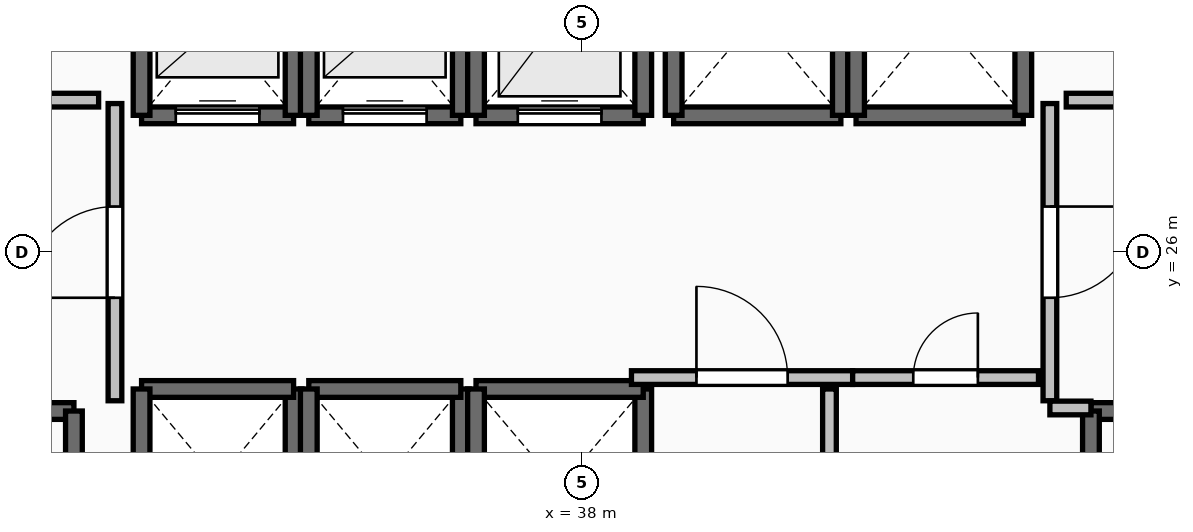
"""IFC4 building model, lengths in metres.
Left out: names, types, materials, properties, quantities, classifications, styles, units other than length and angle.
Written with IfcOpenShell. Run it as: python <this file> out.ifc"""

import sys

from ifc_helpers import new_model, si_unit, direction, frame, frame_2d, origin, place, context, subcontext, project, spatial, rectangle, extrude, element, fill, save


model = new_model("IFC4")
c1 = context("Model", 3, precision=1e-05, world=origin(), true_north=direction((0.0, 1.0)))
c2 = subcontext(c1, "Body", "Model", "MODEL_VIEW")
j1 = project(units=[si_unit("LENGTHUNIT", "METRE"), si_unit("PLANEANGLEUNIT", "RADIAN")], contexts=[c1])
p1 = place(None, origin())
s1 = spatial("IfcSite", under=j1, at=p1, CompositionType="ELEMENT")
p2 = place(p1, origin())
s2 = spatial("IfcBuilding", under=s1, at=p2, CompositionType="ELEMENT")
p3 = place(p2, frame((0.0, 0.0, 106.8)))
s3 = spatial("IfcBuildingStorey", under=s2, at=p3, CompositionType="ELEMENT", Elevation=106.8)
p4 = place(p3, frame((27.94, 23.91, 0.0), z_axis=(0.0, 0.0, 1.0), x_axis=(1.0, 0.0, 0.0)))
e1 = element("IfcWall", 1, at=p4, inside=s3, PredefinedType="SOLIDWALL", context=c2, shape_type="SweptSolid", body=[
    extrude(rectangle(XDim=3.37, YDim=0.22, at=frame_2d((1.685, 0.0))), origin(), (0.0, 0.0, 1.0), 3.24),
])
p5 = place(p4, frame((1.135, 0.0, 0.0)))
e2 = element("IfcOpeningElement", 2, at=p5, cuts=e1, PredefinedType="OPENING", context=c2, shape_type="SweptSolid", body=[
    extrude(rectangle(XDim=1.1, YDim=2.15, at=frame_2d((0.55, 1.075))), frame((0.0, 0.125, 0.0), z_axis=(0.0, -1.0, 0.0), x_axis=(1.0, 0.0, 0.0)), (0.0, 0.0, 1.0), 0.25),
])
p6 = place(p3, frame((31.31, 23.91, 0.0), z_axis=(0.0, 0.0, 1.0), x_axis=(0.0, -1.0, 0.0)))
e3 = element("IfcWall", 3, at=p6, inside=s3, PredefinedType="SOLIDWALL", context=c2, shape_type="SweptSolid", body=[
    extrude(rectangle(XDim=7.42, YDim=0.22, at=frame_2d((3.71, 0.0))), origin(), (0.0, 0.0, 1.0), 3.24),
])
p7 = place(p3, frame((44.69, 23.91, 0.0), z_axis=(0.0, 0.0, 1.0), x_axis=(1.0, 0.0, 0.0)))
e4 = element("IfcWall", 4, at=p7, inside=s3, PredefinedType="SOLIDWALL", context=c2, shape_type="SweptSolid", body=[
    extrude(rectangle(XDim=3.37, YDim=0.22, at=frame_2d((1.685, 0.0))), origin(), (0.0, 0.0, 1.0), 3.24),
])
p8 = place(p7, frame((1.135, 0.0, 0.0)))
e5 = element("IfcOpeningElement", 5, at=p8, cuts=e4, PredefinedType="OPENING", context=c2, shape_type="SweptSolid", body=[
    extrude(rectangle(XDim=1.1, YDim=2.15, at=frame_2d((0.55, 1.075))), frame((0.0, 0.125, 0.0), z_axis=(0.0, -1.0, 0.0), x_axis=(1.0, 0.0, 0.0)), (0.0, 0.0, 1.0), 0.25),
])
p9 = place(p3, frame((44.69, 16.49, 0.0), z_axis=(0.0, 0.0, 1.0), x_axis=(0.0, 1.0, 0.0)))
e6 = element("IfcWall", 6, at=p9, inside=s3, PredefinedType="SOLIDWALL", context=c2, shape_type="SweptSolid", body=[
    extrude(rectangle(XDim=7.42, YDim=0.22, at=frame_2d((3.71, 0.0))), origin(), (0.0, 0.0, 1.0), 3.24),
])
p10 = place(p3, frame((32.2, 27.8, 0.0), z_axis=(0.0, 0.0, 1.0), x_axis=(1.0, 0.0, 0.0)))
e7 = element("IfcWall", 7, at=p10, inside=s3, PredefinedType="SOLIDWALL", context=c2, shape_type="SweptSolid", body=[
    extrude(rectangle(XDim=2.0, YDim=0.22, at=frame_2d((1.0, 0.0))), origin(), (0.0, 0.0, 1.0), 3.24),
])
p11 = place(p10, frame((0.45, 0.0, 0.0)))
e8 = element("IfcOpeningElement", 8, at=p11, cuts=e7, PredefinedType="OPENING", context=c2, shape_type="SweptSolid", body=[
    extrude(rectangle(XDim=1.1, YDim=2.2, at=frame_2d((0.55, 1.1))), frame((0.0, 0.125, 0.0), z_axis=(0.0, -1.0, 0.0), x_axis=(1.0, 0.0, 0.0)), (0.0, 0.0, 1.0), 0.25),
])
for number, where, z_axis, x_axis in (
    (9, (34.2, 27.8, 0.0), (0.0, 0.0, 1.0), (0.0, 1.0, 0.0)),
    (10, (32.2, 30.2, 0.0), (0.0, 0.0, 1.0), (0.0, -1.0, 0.0)),
):
    element("IfcWall", number, at=place(p3, frame(where, z_axis=z_axis, x_axis=x_axis)), inside=s3, PredefinedType="SOLIDWALL", context=c2, shape_type="SweptSolid", body=[
        extrude(rectangle(XDim=2.4, YDim=0.22, at=frame_2d((1.2, 0.0))), origin(), (0.0, 0.0, 1.0), 3.24),
    ])
p12 = place(p3, frame((34.4, 27.8, 0.0), z_axis=(0.0, 0.0, 1.0), x_axis=(1.0, 0.0, 0.0)))
e11 = element("IfcWall", 11, at=p12, inside=s3, PredefinedType="SOLIDWALL", context=c2, shape_type="SweptSolid", body=[
    extrude(rectangle(XDim=2.0, YDim=0.22, at=frame_2d((1.0, 0.0))), origin(), (0.0, 0.0, 1.0), 3.24),
])
p13 = place(p12, frame((0.45, 0.0, 0.0)))
e12 = element("IfcOpeningElement", 12, at=p13, cuts=e11, PredefinedType="OPENING", context=c2, shape_type="SweptSolid", body=[
    extrude(rectangle(XDim=1.1, YDim=2.2, at=frame_2d((0.55, 1.1))), frame((0.0, 0.125, 0.0), z_axis=(0.0, -1.0, 0.0), x_axis=(1.0, 0.0, 0.0)), (0.0, 0.0, 1.0), 0.25),
])
for number, where, z_axis, x_axis in (
    (13, (36.4, 27.8, 0.0), (0.0, 0.0, 1.0), (0.0, 1.0, 0.0)),
    (14, (34.4, 30.2, 0.0), (0.0, 0.0, 1.0), (0.0, -1.0, 0.0)),
):
    element("IfcWall", number, at=place(p3, frame(where, z_axis=z_axis, x_axis=x_axis)), inside=s3, PredefinedType="SOLIDWALL", context=c2, shape_type="SweptSolid", body=[
        extrude(rectangle(XDim=2.4, YDim=0.22, at=frame_2d((1.2, 0.0))), origin(), (0.0, 0.0, 1.0), 3.24),
    ])
p14 = place(p3, frame((36.6, 27.8, 0.0), z_axis=(0.0, 0.0, 1.0), x_axis=(1.0, 0.0, 0.0)))
e15 = element("IfcWall", 15, at=p14, inside=s3, PredefinedType="SOLIDWALL", context=c2, shape_type="SweptSolid", body=[
    extrude(rectangle(XDim=2.2, YDim=0.22, at=frame_2d((1.1, 0.0))), origin(), (0.0, 0.0, 1.0), 3.24),
])
p15 = place(p14, frame((0.55, 0.0, 0.0)))
e16 = element("IfcOpeningElement", 16, at=p15, cuts=e15, PredefinedType="OPENING", context=c2, shape_type="SweptSolid", body=[
    extrude(rectangle(XDim=1.1, YDim=2.2, at=frame_2d((0.55, 1.1))), frame((0.0, 0.125, 0.0), z_axis=(0.0, -1.0, 0.0), x_axis=(1.0, 0.0, 0.0)), (0.0, 0.0, 1.0), 0.25),
])
for number, where, z_axis, x_axis in (
    (17, (38.8, 27.8, 0.0), (0.0, 0.0, 1.0), (0.0, 1.0, 0.0)),
    (18, (36.6, 30.4, 0.0), (0.0, 0.0, 1.0), (0.0, -1.0, 0.0)),
):
    element("IfcWall", number, at=place(p3, frame(where, z_axis=z_axis, x_axis=x_axis)), inside=s3, PredefinedType="SOLIDWALL", context=c2, shape_type="SweptSolid", body=[
        extrude(rectangle(XDim=2.6, YDim=0.22, at=frame_2d((1.3, 0.0))), origin(), (0.0, 0.0, 1.0), 3.24),
    ])
p16 = place(p3, frame((34.2, 21.8, 0.0), z_axis=(0.0, 0.0, 1.0), x_axis=(0.0, 1.0, 0.0)))
e19 = element("IfcWall", 19, at=p16, inside=s3, PredefinedType="SOLIDWALL", context=c2, shape_type="SweptSolid", body=[
    extrude(rectangle(XDim=2.4, YDim=0.22, at=frame_2d((1.2, 0.0))), origin(), (0.0, 0.0, 1.0), 3.24),
])
p17 = place(p3, frame((34.2, 24.2, 0.0), z_axis=(0.0, 0.0, 1.0), x_axis=(-1.0, 0.0, 0.0)))
e20 = element("IfcWall", 20, at=p17, inside=s3, PredefinedType="SOLIDWALL", context=c2, shape_type="SweptSolid", body=[
    extrude(rectangle(XDim=2.0, YDim=0.22, at=frame_2d((1.0, 0.0))), origin(), (0.0, 0.0, 1.0), 3.24),
])
for number, where, z_axis, x_axis in (
    (21, (32.2, 24.2, 0.0), (0.0, 0.0, 1.0), (0.0, -1.0, 0.0)),
    (22, (36.4, 21.8, 0.0), (0.0, 0.0, 1.0), (0.0, 1.0, 0.0)),
):
    element("IfcWall", number, at=place(p3, frame(where, z_axis=z_axis, x_axis=x_axis)), inside=s3, PredefinedType="SOLIDWALL", context=c2, shape_type="SweptSolid", body=[
        extrude(rectangle(XDim=2.4, YDim=0.22, at=frame_2d((1.2, 0.0))), origin(), (0.0, 0.0, 1.0), 3.24),
    ])
p18 = place(p3, frame((36.4, 24.2, 0.0), z_axis=(0.0, 0.0, 1.0), x_axis=(-1.0, 0.0, 0.0)))
e23 = element("IfcWall", 23, at=p18, inside=s3, PredefinedType="SOLIDWALL", context=c2, shape_type="SweptSolid", body=[
    extrude(rectangle(XDim=2.0, YDim=0.22, at=frame_2d((1.0, 0.0))), origin(), (0.0, 0.0, 1.0), 3.24),
])
p19 = place(p3, frame((34.4, 24.2, 0.0), z_axis=(0.0, 0.0, 1.0), x_axis=(0.0, -1.0, 0.0)))
e24 = element("IfcWall", 24, at=p19, inside=s3, PredefinedType="SOLIDWALL", context=c2, shape_type="SweptSolid", body=[
    extrude(rectangle(XDim=2.4, YDim=0.22, at=frame_2d((1.2, 0.0))), origin(), (0.0, 0.0, 1.0), 3.24),
])
p20 = place(p3, frame((38.8, 21.6, 0.0), z_axis=(0.0, 0.0, 1.0), x_axis=(0.0, 1.0, 0.0)))
e25 = element("IfcWall", 25, at=p20, inside=s3, PredefinedType="SOLIDWALL", context=c2, shape_type="SweptSolid", body=[
    extrude(rectangle(XDim=2.6, YDim=0.22, at=frame_2d((1.3, 0.0))), origin(), (0.0, 0.0, 1.0), 3.24),
])
p21 = place(p3, frame((38.8, 24.2, 0.0), z_axis=(0.0, 0.0, 1.0), x_axis=(-1.0, 0.0, 0.0)))
e26 = element("IfcWall", 26, at=p21, inside=s3, PredefinedType="SOLIDWALL", context=c2, shape_type="SweptSolid", body=[
    extrude(rectangle(XDim=2.2, YDim=0.22, at=frame_2d((1.1, 0.0))), origin(), (0.0, 0.0, 1.0), 3.24),
])
p22 = place(p3, frame((36.6, 24.2, 0.0), z_axis=(0.0, 0.0, 1.0), x_axis=(0.0, -1.0, 0.0)))
e27 = element("IfcWall", 27, at=p22, inside=s3, PredefinedType="SOLIDWALL", context=c2, shape_type="SweptSolid", body=[
    extrude(rectangle(XDim=2.6, YDim=0.22, at=frame_2d((1.3, 0.0))), origin(), (0.0, 0.0, 1.0), 3.24),
])
p23 = place(p3, frame((39.2, 27.8, 0.0), z_axis=(0.0, 0.0, 1.0), x_axis=(1.0, 0.0, 0.0)))
e28 = element("IfcWall", 28, at=p23, inside=s3, PredefinedType="SOLIDWALL", context=c2, shape_type="SweptSolid", body=[
    extrude(rectangle(XDim=2.2, YDim=0.22, at=frame_2d((1.1, 0.0))), origin(), (0.0, 0.0, 1.0), 3.24),
])
for number, where, z_axis, x_axis in (
    (29, (41.4, 27.8, 0.0), (0.0, 0.0, 1.0), (0.0, 1.0, 0.0)),
    (30, (39.2, 30.4, 0.0), (0.0, 0.0, 1.0), (0.0, -1.0, 0.0)),
):
    element("IfcWall", number, at=place(p3, frame(where, z_axis=z_axis, x_axis=x_axis)), inside=s3, PredefinedType="SOLIDWALL", context=c2, shape_type="SweptSolid", body=[
        extrude(rectangle(XDim=2.6, YDim=0.22, at=frame_2d((1.3, 0.0))), origin(), (0.0, 0.0, 1.0), 3.24),
    ])
p24 = place(p3, frame((41.6, 27.8, 0.0), z_axis=(0.0, 0.0, 1.0), x_axis=(1.0, 0.0, 0.0)))
e31 = element("IfcWall", 31, at=p24, inside=s3, PredefinedType="SOLIDWALL", context=c2, shape_type="SweptSolid", body=[
    extrude(rectangle(XDim=2.2, YDim=0.22, at=frame_2d((1.1, 0.0))), origin(), (0.0, 0.0, 1.0), 3.24),
])
for number, where, z_axis, x_axis in (
    (32, (43.8, 27.8, 0.0), (0.0, 0.0, 1.0), (0.0, 1.0, 0.0)),
    (33, (41.6, 30.4, 0.0), (0.0, 0.0, 1.0), (0.0, -1.0, 0.0)),
):
    element("IfcWall", number, at=place(p3, frame(where, z_axis=z_axis, x_axis=x_axis)), inside=s3, PredefinedType="SOLIDWALL", context=c2, shape_type="SweptSolid", body=[
        extrude(rectangle(XDim=2.6, YDim=0.22, at=frame_2d((1.3, 0.0))), origin(), (0.0, 0.0, 1.0), 3.24),
    ])
p25 = place(p3, frame((31.85, 24.045, 0.0), z_axis=(0.0, 0.0, 1.0), x_axis=(0.0, 1.0, 0.0)))
e34 = element("IfcWall", 34, at=p25, inside=s3, PredefinedType="PARTITIONING", context=c2, shape_type="SweptSolid", body=[
    extrude(rectangle(XDim=3.91, YDim=0.18, at=frame_2d((1.955, 0.0))), origin(), (0.0, 0.0, 1.0), 3.24),
])
p26 = place(p25, frame((1.355, 0.0, 0.0)))
e35 = element("IfcOpeningElement", 35, at=p26, cuts=e34, PredefinedType="OPENING", context=c2, shape_type="SweptSolid", body=[
    extrude(rectangle(XDim=1.2, YDim=2.15, at=frame_2d((0.6, 1.075))), frame((0.0, 0.105, 0.0), z_axis=(0.0, -1.0, 0.0), x_axis=(1.0, 0.0, 0.0)), (0.0, 0.0, 1.0), 0.21),
])
p27 = place(p3, frame((44.15, 27.955, 0.0), z_axis=(0.0, 0.0, 1.0), x_axis=(0.0, -1.0, 0.0)))
e36 = element("IfcWall", 36, at=p27, inside=s3, PredefinedType="PARTITIONING", context=c2, shape_type="SweptSolid", body=[
    extrude(rectangle(XDim=3.91, YDim=0.18, at=frame_2d((1.955, 0.0))), origin(), (0.0, 0.0, 1.0), 3.24),
])
p28 = place(p27, frame((1.355, 0.0, 0.0)))
e37 = element("IfcOpeningElement", 37, at=p28, cuts=e36, PredefinedType="OPENING", context=c2, shape_type="SweptSolid", body=[
    extrude(rectangle(XDim=1.2, YDim=2.15, at=frame_2d((0.6, 1.075))), frame((0.0, 0.105, 0.0), z_axis=(0.0, -1.0, 0.0), x_axis=(1.0, 0.0, 0.0)), (0.0, 0.0, 1.0), 0.21),
])
p29 = place(p3, frame((44.15, 23.95, 0.0), z_axis=(0.0, 0.0, 1.0), x_axis=(1.0, 0.0, 0.0)))
e38 = element("IfcWall", 38, at=p29, inside=s3, PredefinedType="PARTITIONING", context=c2, shape_type="SweptSolid", body=[
    extrude(rectangle(XDim=0.54, YDim=0.18, at=frame_2d((0.27, 0.0))), origin(), (0.0, 0.0, 1.0), 3.24),
])
p30 = place(p3, frame((38.645, 24.35, 0.0), z_axis=(0.0, 0.0, 1.0), x_axis=(1.0, 0.0, 0.0)))
e39 = element("IfcWall", 39, at=p30, inside=s3, PredefinedType="PARTITIONING", context=c2, shape_type="SweptSolid", body=[
    extrude(rectangle(XDim=2.91, YDim=0.18, at=frame_2d((1.455, 0.0))), origin(), (0.0, 0.0, 1.0), 3.24),
])
p31 = place(p30, frame((0.855, 0.0, 0.0)))
e40 = element("IfcOpeningElement", 40, at=p31, cuts=e39, PredefinedType="OPENING", context=c2, shape_type="SweptSolid", body=[
    extrude(rectangle(XDim=1.2, YDim=2.15, at=frame_2d((0.6, 1.075))), frame((0.0, 0.105, 0.0), z_axis=(0.0, -1.0, 0.0), x_axis=(1.0, 0.0, 0.0)), (0.0, 0.0, 1.0), 0.21),
])
p32 = place(p3, frame((41.555, 24.35, 0.0), z_axis=(0.0, 0.0, 1.0), x_axis=(1.0, 0.0, 0.0)))
e41 = element("IfcWall", 41, at=p32, inside=s3, PredefinedType="PARTITIONING", context=c2, shape_type="SweptSolid", body=[
    extrude(rectangle(XDim=2.445, YDim=0.18, at=frame_2d((1.223, 0.0))), origin(), (0.0, 0.0, 1.0), 3.24),
])
p33 = place(p32, frame((0.798, 0.0, 0.0)))
e42 = element("IfcOpeningElement", 42, at=p33, cuts=e41, PredefinedType="OPENING", context=c2, shape_type="SweptSolid", body=[
    extrude(rectangle(XDim=0.85, YDim=2.1, at=frame_2d((0.425, 1.05))), frame((0.0, 0.105, 0.0), z_axis=(0.0, -1.0, 0.0), x_axis=(1.0, 0.0, 0.0)), (0.0, 0.0, 1.0), 0.21),
])
p34 = place(p3, frame((41.25, 20.305, 0.0), z_axis=(0.0, 0.0, 1.0), x_axis=(0.0, 1.0, 0.0)))
e43 = element("IfcWall", 43, at=p34, inside=s3, PredefinedType="PARTITIONING", context=c2, shape_type="SweptSolid", body=[
    extrude(rectangle(XDim=3.895, YDim=0.18, at=frame_2d((1.948, 0.0))), origin(), (0.0, 0.0, 1.0), 3.24),
])
p35 = place(p34, frame((1.522, 0.0, 0.0)))
e44 = element("IfcOpeningElement", 44, at=p35, cuts=e43, PredefinedType="OPENING", context=c2, shape_type="SweptSolid", body=[
    extrude(rectangle(XDim=0.85, YDim=2.1, at=frame_2d((0.425, 1.05))), frame((0.0, 0.105, 0.0), z_axis=(0.0, -1.0, 0.0), x_axis=(1.0, 0.0, 0.0)), (0.0, 0.0, 1.0), 0.21),
])
for number, where, z_axis, x_axis in (
    (45, (31.635, 28.0, 0.0), (0.0, 0.0, 1.0), (-1.0, 0.0, 0.0)),
    (46, (45.28, 28.0, 0.0), (0.0, 0.0, 1.0), (-1.0, 0.0, 0.0)),
):
    element("IfcWall", number, at=place(p3, frame(where, z_axis=z_axis, x_axis=x_axis)), inside=s3, PredefinedType="PARTITIONING", context=c2, shape_type="SweptSolid", body=[
        extrude(rectangle(XDim=0.915, YDim=0.18, at=frame_2d((0.458, 0.0))), origin(), (0.0, 0.0, 1.0), 3.24),
    ])
p36 = place(p11, origin())
e47 = element("IfcDoor", 47, at=p36, inside=s3, OperationType="SLIDING_TO_LEFT", PredefinedType="DOOR", context=c2, shape_type="SweptSolid", body=[
    extrude(rectangle(XDim=1.1, YDim=2.2, at=frame_2d((0.55, 1.1))), frame((0.0, 0.025, 0.0), z_axis=(0.0, -1.0, 0.0), x_axis=(1.0, 0.0, 0.0)), (0.0, 0.0, 1.0), 0.05),
])
fill(e8, e47)
p37 = place(p13, origin())
e48 = element("IfcDoor", 48, at=p37, inside=s3, OperationType="SLIDING_TO_LEFT", PredefinedType="DOOR", context=c2, shape_type="SweptSolid", body=[
    extrude(rectangle(XDim=1.1, YDim=2.2, at=frame_2d((0.55, 1.1))), frame((0.0, 0.025, 0.0), z_axis=(0.0, -1.0, 0.0), x_axis=(1.0, 0.0, 0.0)), (0.0, 0.0, 1.0), 0.05),
])
fill(e12, e48)
p38 = place(p15, origin())
e49 = element("IfcDoor", 49, at=p38, inside=s3, OperationType="SLIDING_TO_LEFT", PredefinedType="DOOR", context=c2, shape_type="SweptSolid", body=[
    extrude(rectangle(XDim=1.1, YDim=2.2, at=frame_2d((0.55, 1.1))), frame((0.0, 0.025, 0.0), z_axis=(0.0, -1.0, 0.0), x_axis=(1.0, 0.0, 0.0)), (0.0, 0.0, 1.0), 0.05),
])
fill(e16, e49)
p39 = place(p26, origin())
e50 = element("IfcDoor", 50, at=p39, inside=s3, OperationType="SINGLE_SWING_LEFT", PredefinedType="DOOR", context=c2, shape_type="SweptSolid", body=[
    extrude(rectangle(XDim=1.2, YDim=2.15, at=frame_2d((0.6, 1.075))), frame((0.0, 0.025, 0.0), z_axis=(0.0, -1.0, 0.0), x_axis=(1.0, 0.0, 0.0)), (0.0, 0.0, 1.0), 0.05),
])
fill(e35, e50)
p40 = place(p28, origin())
e51 = element("IfcDoor", 51, at=p40, inside=s3, OperationType="SINGLE_SWING_LEFT", PredefinedType="DOOR", context=c2, shape_type="SweptSolid", body=[
    extrude(rectangle(XDim=1.2, YDim=2.15, at=frame_2d((0.6, 1.075))), frame((0.0, 0.025, 0.0), z_axis=(0.0, -1.0, 0.0), x_axis=(1.0, 0.0, 0.0)), (0.0, 0.0, 1.0), 0.05),
])
fill(e37, e51)
p41 = place(p31, origin())
e52 = element("IfcDoor", 52, at=p41, inside=s3, OperationType="SINGLE_SWING_LEFT", PredefinedType="DOOR", context=c2, shape_type="SweptSolid", body=[
    extrude(rectangle(XDim=1.2, YDim=2.15, at=frame_2d((0.6, 1.075))), frame((0.0, 0.025, 0.0), z_axis=(0.0, -1.0, 0.0), x_axis=(1.0, 0.0, 0.0)), (0.0, 0.0, 1.0), 0.05),
])
fill(e40, e52)
p42 = place(p33, origin())
e53 = element("IfcDoor", 53, at=p42, inside=s3, OperationType="SINGLE_SWING_RIGHT", PredefinedType="DOOR", context=c2, shape_type="SweptSolid", body=[
    extrude(rectangle(XDim=0.85, YDim=2.1, at=frame_2d((0.425, 1.05))), frame((0.0, 0.025, 0.0), z_axis=(0.0, -1.0, 0.0), x_axis=(1.0, 0.0, 0.0)), (0.0, 0.0, 1.0), 0.05),
])
fill(e42, e53)
save(model, sys.argv[1])
